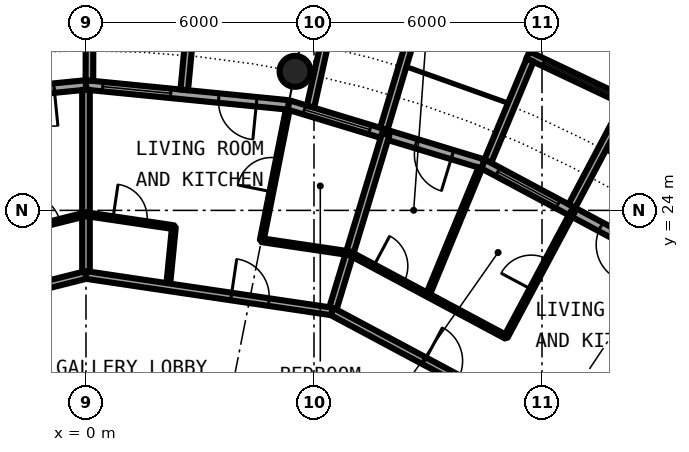
"""IFC4 building model, lengths in metres.
Left out: names, types, materials, properties, quantities, classifications, styles, units other than length and angle.
Written with IfcOpenShell. Run it as: python <this file> out.ifc"""

import sys

from ifc_helpers import new_model, si_unit, direction, frame, frame_2d, origin, origin_2d, place, context, subcontext, project, spatial, rectangle, circle, hollow_circle, extrude, element, fill, save


model = new_model("IFC4")
c1 = context("Model", 3, precision=1e-05, world=origin(), true_north=direction((0.0, 1.0)))
c2 = subcontext(c1, "Body", "Model", "MODEL_VIEW")
j1 = project(units=[si_unit("LENGTHUNIT", "METRE"), si_unit("PLANEANGLEUNIT", "RADIAN")], contexts=[c1])
p1 = place(None, origin())
s1 = spatial("IfcSite", under=j1, at=p1, CompositionType="ELEMENT")
p2 = place(p1, origin())
s2 = spatial("IfcBuilding", under=s1, at=p2, CompositionType="ELEMENT")
p3 = place(p2, frame((0.0, 0.0, 212.7)))
s3 = spatial("IfcBuildingStorey", under=s2, at=p3, CompositionType="ELEMENT", Elevation=212.7)
p4 = place(p3, frame((5.501, 27.658, 0.0), z_axis=(0.0, 0.0, 1.0), x_axis=(1.0, 0.0, 0.0)))
e1 = element("IfcColumn", 1, at=p4, inside=s3, PredefinedType="COLUMN", context=c2, shape_type="SweptSolid", body=[
    extrude(hollow_circle(Radius=0.406, WallThickness=0.03, at=origin_2d()), origin(), (0.0, 0.0, 1.0), 3.05),
])
p5 = place(p3, frame((15.167, 22.699, 0.0), z_axis=(0.0, 0.0, 1.0), x_axis=(-0.881915646801, 0.471407246368, 0.0)))
e2 = element("IfcWall", 2, at=p5, inside=s3, PredefinedType="SOLIDWALL", context=c2, shape_type="SweptSolid", body=[
    extrude(rectangle(XDim=5.352, YDim=0.25, at=frame_2d((2.676, 0.0))), origin(), (0.0, 0.0, 1.0), 2.7),
])
p6 = place(p5, frame((0.841, 0.0, 0.0)))
e3 = element("IfcOpeningElement", 3, at=p6, cuts=e2, PredefinedType="OPENING", context=c2, shape_type="SweptSolid", body=[
    extrude(rectangle(XDim=1.0, YDim=2.2, at=frame_2d((0.5, 1.1))), frame((0.0, 0.135, 0.0), z_axis=(0.0, -1.0, 0.0), x_axis=(1.0, 0.0, 0.0)), (0.0, 0.0, 1.0), 0.27),
])
p7 = place(p5, frame((3.111, 0.0, 0.3)))
e4 = element("IfcOpeningElement", 4, at=p7, cuts=e2, PredefinedType="OPENING", context=c2, shape_type="SweptSolid", body=[
    extrude(rectangle(XDim=1.8, YDim=2.1, at=frame_2d((0.9, 1.05))), frame((0.0, 0.135, 0.0), z_axis=(0.0, -1.0, 0.0), x_axis=(1.0, 0.0, 0.0)), (0.0, 0.0, 1.0), 0.27),
])
p8 = place(p3, frame((14.335, 26.808, -0.03), z_axis=(0.0, 0.0, 1.0), x_axis=(-0.904000060331, 0.427532327342, 0.0)))
e5 = element("IfcWall", 5, at=p8, inside=s3, PredefinedType="SOLIDWALL", context=c2, shape_type="SweptSolid", body=[
    extrude(rectangle(XDim=2.993, YDim=0.2, at=frame_2d((1.497, 0.0))), origin(), (0.0, 0.0, 1.0), 2.73),
])
p9 = place(p8, frame((0.457, 0.0, 0.33)))
e6 = element("IfcOpeningElement", 6, at=p9, cuts=e5, PredefinedType="OPENING", context=c2, shape_type="SweptSolid", body=[
    extrude(circle(Radius=1.04, at=frame_2d((1.04, 1.04))), frame((0.0, 0.11, 0.0), z_axis=(0.0, -1.0, 0.0), x_axis=(1.0, 0.0, 0.0)), (0.0, 0.0, 1.0), 0.22),
])
p10 = place(p3, frame((12.787, 24.113, -0.03), z_axis=(0.0, 0.0, 1.0), x_axis=(0.468365282436, 0.883534924159, 0.0)))
e7 = element("IfcWall", 7, at=p10, inside=s3, PredefinedType="SOLIDWALL", context=c2, shape_type="SweptSolid", body=[
    extrude(rectangle(XDim=3.006, YDim=0.2, at=frame_2d((1.503, 0.0))), origin(), (0.0, 0.0, 1.0), 2.73),
])
p11 = place(p3, frame((10.575, 25.295, -0.03), z_axis=(0.0, 0.0, 1.0), x_axis=(0.385697364644, 0.922625353492, 0.0)))
e8 = element("IfcWall", 8, at=p11, inside=s3, PredefinedType="SOLIDWALL", context=c2, shape_type="SweptSolid", body=[
    extrude(rectangle(XDim=2.883, YDim=0.2, at=frame_2d((1.442, 0.0))), origin(), (0.0, 0.0, 1.0), 2.73),
])
p12 = place(p3, frame((10.447, 25.222, 0.0), z_axis=(0.0, 0.0, 1.0), x_axis=(-0.956965678721, 0.290201119486, 0.0)))
e9 = element("IfcWall", 9, at=p12, inside=s3, PredefinedType="SOLIDWALL", context=c2, shape_type="SweptSolid", body=[
    extrude(rectangle(XDim=5.351, YDim=0.25, at=frame_2d((2.676, 0.0))), origin(), (0.0, 0.0, 1.0), 2.7),
])
p13 = place(p12, frame((0.841, 0.0, 0.0)))
e10 = element("IfcOpeningElement", 10, at=p13, cuts=e9, PredefinedType="OPENING", context=c2, shape_type="SweptSolid", body=[
    extrude(rectangle(XDim=1.0, YDim=2.2, at=frame_2d((0.5, 1.1))), frame((0.0, 0.135, 0.0), z_axis=(0.0, -1.0, 0.0), x_axis=(1.0, 0.0, 0.0)), (0.0, 0.0, 1.0), 0.27),
])
p14 = place(p12, frame((3.111, 0.0, 0.3)))
e11 = element("IfcOpeningElement", 11, at=p14, cuts=e9, PredefinedType="OPENING", context=c2, shape_type="SweptSolid", body=[
    extrude(rectangle(XDim=1.8, YDim=2.1, at=frame_2d((0.9, 1.05))), frame((0.0, 0.135, 0.0), z_axis=(0.0, -1.0, 0.0), x_axis=(1.0, 0.0, 0.0)), (0.0, 0.0, 1.0), 0.27),
])
p15 = place(p3, frame((7.837, 26.144, -0.03), z_axis=(0.0, 0.0, 1.0), x_axis=(0.287064767992, 0.957911174889, 0.0)))
e12 = element("IfcWall", 12, at=p15, inside=s3, PredefinedType="SOLIDWALL", context=c2, shape_type="SweptSolid", body=[
    extrude(rectangle(XDim=3.006, YDim=0.2, at=frame_2d((1.503, 0.0))), origin(), (0.0, 0.0, 1.0), 2.73),
])
p16 = place(p3, frame((5.909, 26.729, -0.03), z_axis=(0.0, 0.0, 1.0), x_axis=(0.216409053917, 0.976302781612, 0.0)))
e13 = element("IfcWall", 13, at=p16, inside=s3, PredefinedType="SOLIDWALL", context=c2, shape_type="SweptSolid", body=[
    extrude(rectangle(XDim=2.925, YDim=0.2, at=frame_2d((1.463, 0.0))), origin(), (0.0, 0.0, 1.0), 2.73),
])
p17 = place(p3, frame((5.326, 26.775, 0.0), z_axis=(0.0, 0.0, 1.0), x_axis=(-0.995173996315, 0.098126026407, 0.0)))
e14 = element("IfcWall", 14, at=p17, inside=s3, PredefinedType="SOLIDWALL", context=c2, shape_type="SweptSolid", body=[
    extrude(rectangle(XDim=5.352, YDim=0.25, at=frame_2d((2.676, 0.0))), origin(), (0.0, 0.0, 1.0), 2.7),
])
p18 = place(p17, frame((0.841, 0.0, 0.0)))
e15 = element("IfcOpeningElement", 15, at=p18, cuts=e14, PredefinedType="OPENING", context=c2, shape_type="SweptSolid", body=[
    extrude(rectangle(XDim=1.0, YDim=2.2, at=frame_2d((0.5, 1.1))), frame((0.0, 0.135, 0.0), z_axis=(0.0, -1.0, 0.0), x_axis=(1.0, 0.0, 0.0)), (0.0, 0.0, 1.0), 0.27),
])
p19 = place(p17, frame((3.111, 0.0, 0.3)))
e16 = element("IfcOpeningElement", 16, at=p19, cuts=e14, PredefinedType="OPENING", context=c2, shape_type="SweptSolid", body=[
    extrude(rectangle(XDim=1.8, YDim=2.1, at=frame_2d((0.9, 1.05))), frame((0.0, 0.135, 0.0), z_axis=(0.0, -1.0, 0.0), x_axis=(1.0, 0.0, 0.0)), (0.0, 0.0, 1.0), 0.27),
])
p20 = place(p3, frame((2.586, 27.171, -0.03), z_axis=(0.0, 0.0, 1.0), x_axis=(0.094548432284, 0.995520262954, 0.0)))
e17 = element("IfcWall", 17, at=p20, inside=s3, PredefinedType="SOLIDWALL", context=c2, shape_type="SweptSolid", body=[
    extrude(rectangle(XDim=3.006, YDim=0.2, at=frame_2d((1.503, 0.0))), origin(), (0.0, 0.0, 1.0), 2.73),
])
p21 = place(p3, frame((0.09, 27.417, -0.03), z_axis=(0.0, 0.0, 1.0), x_axis=(0.00347308367, 0.999993968827, 0.0)))
e18 = element("IfcWall", 18, at=p21, inside=s3, PredefinedType="SOLIDWALL", context=c2, shape_type="SweptSolid", body=[
    extrude(rectangle(XDim=2.882, YDim=0.2, at=frame_2d((1.441, 0.0))), origin(), (0.0, 0.0, 1.0), 2.73),
])
p22 = place(p3, frame((0.0, 27.3, 0.0), z_axis=(0.0, 0.0, 1.0), x_axis=(-0.995173996315, -0.098126026407, 0.0)))
e19 = element("IfcWall", 19, at=p22, inside=s3, PredefinedType="SOLIDWALL", context=c2, shape_type="SweptSolid", body=[
    extrude(rectangle(XDim=5.352, YDim=0.25, at=frame_2d((2.676, 0.0))), origin(), (0.0, 0.0, 1.0), 2.7),
])
p23 = place(p22, frame((0.841, 0.0, 0.0)))
e20 = element("IfcOpeningElement", 20, at=p23, cuts=e19, PredefinedType="OPENING", context=c2, shape_type="SweptSolid", body=[
    extrude(rectangle(XDim=1.0, YDim=2.2, at=frame_2d((0.5, 1.1))), frame((0.0, 0.135, 0.0), z_axis=(0.0, -1.0, 0.0), x_axis=(1.0, 0.0, 0.0)), (0.0, 0.0, 1.0), 0.27),
])
p24 = place(p22, frame((3.111, 0.0, 0.3)))
e21 = element("IfcOpeningElement", 21, at=p24, cuts=e19, PredefinedType="OPENING", context=c2, shape_type="SweptSolid", body=[
    extrude(rectangle(XDim=1.8, YDim=2.1, at=frame_2d((0.9, 1.05))), frame((0.0, 0.135, 0.0), z_axis=(0.0, -1.0, 0.0), x_axis=(1.0, 0.0, 0.0)), (0.0, 0.0, 1.0), 0.27),
])
p25 = place(p3, frame((0.0, 22.3, 0.0), z_axis=(0.0, 0.0, 1.0), x_axis=(0.0, 1.0, 0.0)))
e22 = element("IfcWall", 22, at=p25, inside=s3, PredefinedType="PARTITIONING", context=c2, shape_type="SweptSolid", body=[
    extrude(rectangle(XDim=4.875, YDim=0.2, at=frame_2d((2.438, 0.0))), origin(), (0.0, 0.0, 1.0), 2.7),
])
p26 = place(p3, frame((2.158, 21.98, 0.0), z_axis=(0.0, 0.0, 1.0), x_axis=(0.097840737576, 0.995202085041, 0.0)))
e23 = element("IfcWall", 23, at=p26, inside=s3, PredefinedType="PARTITIONING", context=c2, shape_type="SweptSolid", body=[
    extrude(rectangle(XDim=1.584, YDim=0.1, at=frame_2d((0.792, 0.0))), origin(), (0.0, 0.0, 1.0), 2.7),
])
p27 = place(p3, frame((4.625, 23.214, 0.0), z_axis=(0.0, 0.0, 1.0), x_axis=(0.195486409601, 0.980706410533, 0.0)))
e24 = element("IfcWall", 24, at=p27, inside=s3, PredefinedType="PARTITIONING", context=c2, shape_type="SweptSolid", body=[
    extrude(rectangle(XDim=3.504, YDim=0.1, at=frame_2d((1.752, 0.0))), origin(), (0.0, 0.0, 1.0), 2.7),
])
p28 = place(p27, frame((1.302, 0.0, 0.0)))
e25 = element("IfcOpeningElement", 25, at=p28, cuts=e24, PredefinedType="OPENING", context=c2, shape_type="SweptSolid", body=[
    extrude(rectangle(XDim=0.9, YDim=2.3, at=frame_2d((0.45, 1.15))), frame((0.0, 0.06, 0.0), z_axis=(0.0, -1.0, 0.0), x_axis=(1.0, 0.0, 0.0)), (0.0, 0.0, 1.0), 0.12),
])
p29 = place(p3, frame((6.474, 21.34, 0.0), z_axis=(0.0, 0.0, 1.0), x_axis=(0.290053269332, 0.957010502006, 0.0)))
e26 = element("IfcWall", 26, at=p29, inside=s3, PredefinedType="PARTITIONING", context=c2, shape_type="SweptSolid", body=[
    extrude(rectangle(XDim=4.874, YDim=0.2, at=frame_2d((2.437, 0.0))), origin(), (0.0, 0.0, 1.0), 2.7),
])
p30 = place(p3, frame((8.994, 21.772, 0.0), z_axis=(0.0, 0.0, 1.0), x_axis=(0.381733837918, 0.924272295911, 0.0)))
e27 = element("IfcWall", 27, at=p30, inside=s3, PredefinedType="PARTITIONING", context=c2, shape_type="SweptSolid", body=[
    extrude(rectangle(XDim=3.618, YDim=0.1, at=frame_2d((1.809, 0.0))), origin(), (0.0, 0.0, 1.0), 2.7),
])
p31 = place(p3, frame((11.05, 20.673, 0.0), z_axis=(0.0, 0.0, 1.0), x_axis=(0.471372010014, 0.881934480659, 0.0)))
e28 = element("IfcWall", 28, at=p31, inside=s3, PredefinedType="PARTITIONING", context=c2, shape_type="SweptSolid", body=[
    extrude(rectangle(XDim=3.734, YDim=0.1, at=frame_2d((1.867, 0.0))), origin(), (0.0, 0.0, 1.0), 2.7),
])
p32 = place(p31, frame((1.417, 0.0, 0.0)))
e29 = element("IfcOpeningElement", 29, at=p32, cuts=e28, PredefinedType="OPENING", context=c2, shape_type="SweptSolid", body=[
    extrude(rectangle(XDim=0.9, YDim=2.3, at=frame_2d((0.45, 1.15))), frame((0.0, 0.06, 0.0), z_axis=(0.0, -1.0, 0.0), x_axis=(1.0, 0.0, 0.0)), (0.0, 0.0, 1.0), 0.12),
])
p33 = place(p3, frame((-10.521, 19.662, 0.0), z_axis=(0.0, 0.0, 1.0), x_axis=(0.969975443945, 0.243202874456, 0.0)))
e30 = element("IfcWall", 30, at=p33, inside=s3, PredefinedType="PARTITIONING", context=c2, shape_type="SweptSolid", body=[
    extrude(rectangle(XDim=10.847, YDim=0.2, at=frame_2d((5.423, 0.0))), origin(), (0.0, 0.0, 1.0), 2.7),
])
p34 = place(p33, frame((4.928, 0.0, 0.0)))
e31 = element("IfcOpeningElement", 31, at=p34, cuts=e30, PredefinedType="OPENING", context=c2, shape_type="SweptSolid", body=[
    extrude(rectangle(XDim=1.0, YDim=2.3, at=frame_2d((0.5, 1.15))), frame((0.0, 0.11, 0.0), z_axis=(0.0, -1.0, 0.0), x_axis=(1.0, 0.0, 0.0)), (0.0, 0.0, 1.0), 0.22),
])
p35 = place(p3, frame((6.473, 21.34, 0.0), z_axis=(0.0, 0.0, 1.0), x_axis=(0.881912965532, -0.471412262491, 0.0)))
e32 = element("IfcWall", 32, at=p35, inside=s3, PredefinedType="PARTITIONING", context=c2, shape_type="SweptSolid", body=[
    extrude(rectangle(XDim=8.702, YDim=0.2, at=frame_2d((4.351, 0.0))), origin(), (0.0, 0.0, 1.0), 2.7),
])
p36 = place(p35, frame((2.764, 0.0, 0.0)))
e33 = element("IfcOpeningElement", 33, at=p36, cuts=e32, PredefinedType="OPENING", context=c2, shape_type="SweptSolid", body=[
    extrude(rectangle(XDim=1.0, YDim=2.3, at=frame_2d((0.5, 1.15))), frame((0.0, 0.11, 0.0), z_axis=(0.0, -1.0, 0.0), x_axis=(1.0, 0.0, 0.0)), (0.0, 0.0, 1.0), 0.22),
])
p37 = place(p3, frame((0.0, 22.3, 0.0), z_axis=(0.0, 0.0, 1.0), x_axis=(0.989181015112, -0.146700100005, 0.0)))
e34 = element("IfcWall", 34, at=p37, inside=s3, PredefinedType="PARTITIONING", context=c2, shape_type="SweptSolid", body=[
    extrude(rectangle(XDim=6.544, YDim=0.2, at=frame_2d((3.272, 0.0))), origin(), (0.0, 0.0, 1.0), 2.7),
])
p38 = place(p37, frame((3.863, 0.0, 0.0)))
e35 = element("IfcOpeningElement", 35, at=p38, cuts=e34, PredefinedType="OPENING", context=c2, shape_type="SweptSolid", body=[
    extrude(rectangle(XDim=1.0, YDim=2.3, at=frame_2d((0.5, 1.15))), frame((0.0, 0.11, 0.0), z_axis=(0.0, -1.0, 0.0), x_axis=(1.0, 0.0, 0.0)), (0.0, 0.0, 1.0), 0.22),
])
p39 = place(p3, frame((-2.253, 23.334, 0.0), z_axis=(0.0, 0.0, 1.0), x_axis=(0.970068250789, 0.242832429489, 0.0)))
e36 = element("IfcWall", 36, at=p39, inside=s3, PredefinedType="PARTITIONING", context=c2, shape_type="SweptSolid", body=[
    extrude(rectangle(XDim=2.323, YDim=0.1, at=frame_2d((1.161, 0.0))), origin(), (0.0, 0.0, 1.0), 2.7),
])
p40 = place(p39, frame((0.712, 0.0, 0.0)))
e37 = element("IfcOpeningElement", 37, at=p40, cuts=e36, PredefinedType="OPENING", context=c2, shape_type="SweptSolid", body=[
    extrude(rectangle(XDim=0.9, YDim=2.3, at=frame_2d((0.45, 1.15))), frame((0.0, 0.06, 0.0), z_axis=(0.0, -1.0, 0.0), x_axis=(1.0, 0.0, 0.0)), (0.0, 0.0, 1.0), 0.12),
])
p41 = place(p3, frame((6.938, 22.871, 0.0), z_axis=(0.0, 0.0, 1.0), x_axis=(0.881916280728, -0.471406060405, 0.0)))
e38 = element("IfcWall", 38, at=p41, inside=s3, PredefinedType="PARTITIONING", context=c2, shape_type="SweptSolid", body=[
    extrude(rectangle(XDim=4.663, YDim=0.1, at=frame_2d((2.331, 0.0))), origin(), (0.0, 0.0, 1.0), 2.7),
])
p42 = place(p41, frame((0.716, 0.0, 0.0)))
e39 = element("IfcOpeningElement", 39, at=p42, cuts=e38, PredefinedType="OPENING", context=c2, shape_type="SweptSolid", body=[
    extrude(rectangle(XDim=0.9, YDim=2.3, at=frame_2d((0.45, 1.15))), frame((0.0, 0.06, 0.0), z_axis=(0.0, -1.0, 0.0), x_axis=(1.0, 0.0, 0.0)), (0.0, 0.0, 1.0), 0.12),
])
p43 = place(p3, frame((0.0, 23.9, 0.0), z_axis=(0.0, 0.0, 1.0), x_axis=(0.989181588285, -0.146696235121, 0.0)))
e40 = element("IfcWall", 40, at=p43, inside=s3, PredefinedType="PARTITIONING", context=c2, shape_type="SweptSolid", body=[
    extrude(rectangle(XDim=2.338, YDim=0.1, at=frame_2d((1.169, 0.0))), origin(), (0.0, 0.0, 1.0), 2.7),
])
p44 = place(p43, frame((0.719, 0.0, 0.0)))
e41 = element("IfcOpeningElement", 41, at=p44, cuts=e40, PredefinedType="OPENING", context=c2, shape_type="SweptSolid", body=[
    extrude(rectangle(XDim=0.9, YDim=2.3, at=frame_2d((0.45, 1.15))), frame((0.0, 0.06, 0.0), z_axis=(0.0, -1.0, 0.0), x_axis=(1.0, 0.0, 0.0)), (0.0, 0.0, 1.0), 0.12),
])
p45 = place(p3, frame((4.625, 23.214, 0.0), z_axis=(0.0, 0.0, 1.0), x_axis=(0.989181588285, -0.146696235121, 0.0)))
e42 = element("IfcWall", 42, at=p45, inside=s3, PredefinedType="PARTITIONING", context=c2, shape_type="SweptSolid", body=[
    extrude(rectangle(XDim=2.338, YDim=0.1, at=frame_2d((1.169, 0.0))), origin(), (0.0, 0.0, 1.0), 2.7),
])
p46 = place(p6, origin())
e43 = element("IfcDoor", 43, at=p46, inside=s3, OperationType="SINGLE_SWING_LEFT", PredefinedType="DOOR", context=c2, shape_type="SweptSolid", body=[
    extrude(rectangle(XDim=1.0, YDim=2.2, at=frame_2d((0.5, 1.1))), frame((0.0, 0.025, 0.0), z_axis=(0.0, -1.0, 0.0), x_axis=(1.0, 0.0, 0.0)), (0.0, 0.0, 1.0), 0.05),
])
fill(e3, e43)
p47 = place(p7, origin())
e44 = element("IfcWindow", 44, at=p47, inside=s3, PartitioningType="SINGLE_PANEL", PredefinedType="WINDOW", context=c2, shape_type="SweptSolid", body=[
    extrude(rectangle(XDim=1.8, YDim=2.1, at=frame_2d((0.9, 1.05))), frame((0.0, 0.03, 0.0), z_axis=(0.0, -1.0, 0.0), x_axis=(1.0, 0.0, 0.0)), (0.0, 0.0, 1.0), 0.06),
])
fill(e4, e44)
p48 = place(p9, origin())
e45 = element("IfcWindow", 45, at=p48, inside=s3, PartitioningType="SINGLE_PANEL", PredefinedType="WINDOW", context=c2, shape_type="SweptSolid", body=[
    extrude(circle(Radius=1.04, at=frame_2d((1.04, 1.04))), frame((0.0, 0.03, 0.0), z_axis=(0.0, -1.0, 0.0), x_axis=(1.0, 0.0, 0.0)), (0.0, 0.0, 1.0), 0.06),
])
fill(e6, e45)
p49 = place(p13, origin())
e46 = element("IfcDoor", 46, at=p49, inside=s3, OperationType="SINGLE_SWING_LEFT", PredefinedType="DOOR", context=c2, shape_type="SweptSolid", body=[
    extrude(rectangle(XDim=1.0, YDim=2.2, at=frame_2d((0.5, 1.1))), frame((0.0, 0.025, 0.0), z_axis=(0.0, -1.0, 0.0), x_axis=(1.0, 0.0, 0.0)), (0.0, 0.0, 1.0), 0.05),
])
fill(e10, e46)
p50 = place(p14, origin())
e47 = element("IfcWindow", 47, at=p50, inside=s3, PartitioningType="SINGLE_PANEL", PredefinedType="WINDOW", context=c2, shape_type="SweptSolid", body=[
    extrude(rectangle(XDim=1.8, YDim=2.1, at=frame_2d((0.9, 1.05))), frame((0.0, 0.03, 0.0), z_axis=(0.0, -1.0, 0.0), x_axis=(1.0, 0.0, 0.0)), (0.0, 0.0, 1.0), 0.06),
])
fill(e11, e47)
p51 = place(p18, origin())
e48 = element("IfcDoor", 48, at=p51, inside=s3, OperationType="SINGLE_SWING_LEFT", PredefinedType="DOOR", context=c2, shape_type="SweptSolid", body=[
    extrude(rectangle(XDim=1.0, YDim=2.2, at=frame_2d((0.5, 1.1))), frame((0.0, 0.025, 0.0), z_axis=(0.0, -1.0, 0.0), x_axis=(1.0, 0.0, 0.0)), (0.0, 0.0, 1.0), 0.05),
])
fill(e15, e48)
p52 = place(p19, origin())
e49 = element("IfcWindow", 49, at=p52, inside=s3, PartitioningType="SINGLE_PANEL", PredefinedType="WINDOW", context=c2, shape_type="SweptSolid", body=[
    extrude(rectangle(XDim=1.8, YDim=2.1, at=frame_2d((0.9, 1.05))), frame((0.0, 0.03, 0.0), z_axis=(0.0, -1.0, 0.0), x_axis=(1.0, 0.0, 0.0)), (0.0, 0.0, 1.0), 0.06),
])
fill(e16, e49)
p53 = place(p23, origin())
e50 = element("IfcDoor", 50, at=p53, inside=s3, OperationType="SINGLE_SWING_LEFT", PredefinedType="DOOR", context=c2, shape_type="SweptSolid", body=[
    extrude(rectangle(XDim=1.0, YDim=2.2, at=frame_2d((0.5, 1.1))), frame((0.0, 0.025, 0.0), z_axis=(0.0, -1.0, 0.0), x_axis=(1.0, 0.0, 0.0)), (0.0, 0.0, 1.0), 0.05),
])
fill(e20, e50)
p54 = place(p36, origin())
e51 = element("IfcDoor", 51, at=p54, inside=s3, OperationType="SINGLE_SWING_LEFT", PredefinedType="DOOR", context=c2, shape_type="SweptSolid", body=[
    extrude(rectangle(XDim=1.0, YDim=2.3, at=frame_2d((0.5, 1.15))), frame((0.0, 0.025, 0.0), z_axis=(0.0, -1.0, 0.0), x_axis=(1.0, 0.0, 0.0)), (0.0, 0.0, 1.0), 0.05),
])
fill(e33, e51)
p55 = place(p32, origin())
e52 = element("IfcDoor", 52, at=p55, inside=s3, OperationType="SINGLE_SWING_LEFT", PredefinedType="DOOR", context=c2, shape_type="SweptSolid", body=[
    extrude(rectangle(XDim=0.9, YDim=2.3, at=frame_2d((0.45, 1.15))), frame((0.0, 0.025, 0.0), z_axis=(0.0, -1.0, 0.0), x_axis=(1.0, 0.0, 0.0)), (0.0, 0.0, 1.0), 0.05),
])
fill(e29, e52)
p56 = place(p42, origin())
e53 = element("IfcDoor", 53, at=p56, inside=s3, OperationType="SINGLE_SWING_LEFT", PredefinedType="DOOR", context=c2, shape_type="SweptSolid", body=[
    extrude(rectangle(XDim=0.9, YDim=2.3, at=frame_2d((0.45, 1.15))), frame((0.0, 0.025, 0.0), z_axis=(0.0, -1.0, 0.0), x_axis=(1.0, 0.0, 0.0)), (0.0, 0.0, 1.0), 0.05),
])
fill(e39, e53)
p57 = place(p38, origin())
e54 = element("IfcDoor", 54, at=p57, inside=s3, OperationType="SINGLE_SWING_RIGHT", PredefinedType="DOOR", context=c2, shape_type="SweptSolid", body=[
    extrude(rectangle(XDim=1.0, YDim=2.3, at=frame_2d((0.5, 1.15))), frame((0.0, 0.025, 0.0), z_axis=(0.0, -1.0, 0.0), x_axis=(1.0, 0.0, 0.0)), (0.0, 0.0, 1.0), 0.05),
])
fill(e35, e54)
p58 = place(p44, origin())
e55 = element("IfcDoor", 55, at=p58, inside=s3, OperationType="SINGLE_SWING_RIGHT", PredefinedType="DOOR", context=c2, shape_type="SweptSolid", body=[
    extrude(rectangle(XDim=0.9, YDim=2.3, at=frame_2d((0.45, 1.15))), frame((0.0, 0.025, 0.0), z_axis=(0.0, -1.0, 0.0), x_axis=(1.0, 0.0, 0.0)), (0.0, 0.0, 1.0), 0.05),
])
fill(e41, e55)
p59 = place(p28, origin())
e56 = element("IfcDoor", 56, at=p59, inside=s3, OperationType="SINGLE_SWING_LEFT", PredefinedType="DOOR", context=c2, shape_type="SweptSolid", body=[
    extrude(rectangle(XDim=0.9, YDim=2.3, at=frame_2d((0.45, 1.15))), frame((0.0, 0.025, 0.0), z_axis=(0.0, -1.0, 0.0), x_axis=(1.0, 0.0, 0.0)), (0.0, 0.0, 1.0), 0.05),
])
fill(e25, e56)
p60 = place(p40, origin())
e57 = element("IfcDoor", 57, at=p60, inside=s3, OperationType="SINGLE_SWING_RIGHT", PredefinedType="DOOR", context=c2, shape_type="SweptSolid", body=[
    extrude(rectangle(XDim=0.9, YDim=2.3, at=frame_2d((0.45, 1.15))), frame((0.0, 0.025, 0.0), z_axis=(0.0, -1.0, 0.0), x_axis=(1.0, 0.0, 0.0)), (0.0, 0.0, 1.0), 0.05),
])
fill(e37, e57)
save(model, sys.argv[1])
